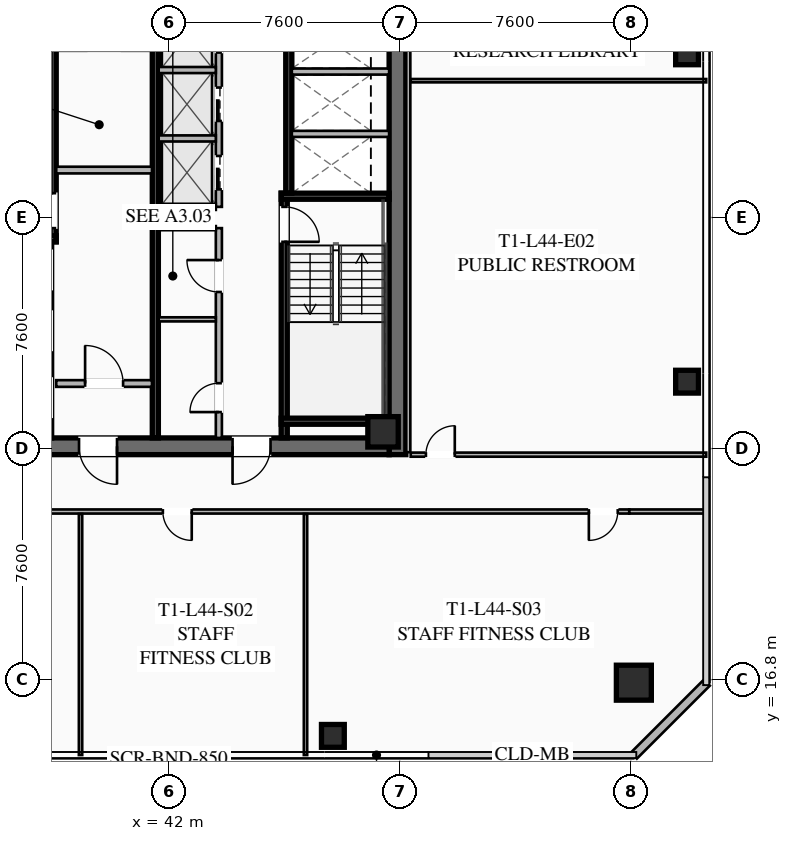
"""IFC4 building model, lengths in metres.
Left out: names, types, materials, properties, quantities, classifications, styles, units other than length and angle.
Written with IfcOpenShell. Run it as: python <this file> out.ifc"""

import sys

from ifc_helpers import new_model, si_unit, direction, frame, frame_2d, origin, origin_2d, place, context, subcontext, project, spatial, rectangle, hollow_rectangle, extrude, element, fill, save


model = new_model("IFC4")
c1 = context("Model", 3, precision=1e-05, world=origin(), true_north=direction((0.0, 1.0)))
c2 = subcontext(c1, "Body", "Model", "MODEL_VIEW")
j1 = project(units=[si_unit("LENGTHUNIT", "METRE"), si_unit("PLANEANGLEUNIT", "RADIAN")], contexts=[c1])
p1 = place(None, origin())
s1 = spatial("IfcSite", under=j1, at=p1, CompositionType="ELEMENT")
p2 = place(p1, origin())
s2 = spatial("IfcBuilding", under=s1, at=p2, CompositionType="ELEMENT")
p3 = place(p2, frame((0.0, 0.0, 164.1)))
s3 = spatial("IfcBuildingStorey", under=s2, at=p3, CompositionType="ELEMENT", Elevation=164.1)
p4 = place(p3, frame((49.525, 39.8, 0.0), z_axis=(0.0, 0.0, 1.0), x_axis=(0.0, -1.0, 0.0)))
e1 = element("IfcWall", 1, at=p4, inside=s3, PredefinedType="SHEAR", context=c2, shape_type="SweptSolid", body=[
    extrude(rectangle(XDim=15.6, YDim=0.55, at=frame_2d((7.8, 0.0))), origin(), (0.0, 0.0, 1.0), 3.55),
])
p5 = place(p3, frame((49.25, 24.475, 0.0), z_axis=(0.0, 0.0, 1.0), x_axis=(-1.0, 0.0, 0.0)))
e2 = element("IfcWall", 2, at=p5, inside=s3, PredefinedType="SHEAR", context=c2, shape_type="SweptSolid", body=[
    extrude(rectangle(XDim=14.5, YDim=0.55, at=frame_2d((7.25, 0.0))), origin(), (0.0, 0.0, 1.0), 3.55),
])
p6 = place(p5, frame((8.95, 0.0, 0.0)))
e3 = element("IfcOpeningElement", 3, at=p6, cuts=e2, PredefinedType="OPENING", context=c2, shape_type="SweptSolid", body=[
    extrude(rectangle(XDim=1.25, YDim=2.25, at=frame_2d((0.625, 1.125))), frame((0.0, 0.285, 0.0), z_axis=(0.0, -1.0, 0.0), x_axis=(1.0, 0.0, 0.0)), (0.0, 0.0, 1.0), 0.57),
])
p7 = place(p5, frame((3.9, 0.0, 0.0)))
e4 = element("IfcOpeningElement", 4, at=p7, cuts=e2, PredefinedType="OPENING", context=c2, shape_type="SweptSolid", body=[
    extrude(rectangle(XDim=1.25, YDim=2.25, at=frame_2d((0.625, 1.125))), frame((0.0, 0.285, 0.0), z_axis=(0.0, -1.0, 0.0), x_axis=(1.0, 0.0, 0.0)), (0.0, 0.0, 1.0), 0.57),
])
p8 = place(p3, frame((49.05, 24.95, 0.0), z_axis=(0.0, 0.0, 1.0), x_axis=(1.0, 0.0, 0.0)))
e5 = element("IfcColumn", 5, at=p8, inside=s3, PredefinedType="COLUMN", context=c2, shape_type="SweptSolid", body=[
    extrude(hollow_rectangle(XDim=1.0, YDim=1.0, WallThickness=0.04, at=origin_2d()), origin(), (0.0, 0.0, 1.0), 3.37),
])
p9 = place(p3, frame((57.3, 16.7, 0.0), z_axis=(0.0, 0.0, 1.0), x_axis=(1.0, 0.0, 0.0)))
e6 = element("IfcColumn", 6, at=p9, inside=s3, PredefinedType="COLUMN", context=c2, shape_type="SweptSolid", body=[
    extrude(hollow_rectangle(XDim=1.15, YDim=1.15, WallThickness=0.045, at=origin_2d()), origin(), (0.0, 0.0, 1.0), 3.37),
])
for number, where, z_axis, x_axis in (
    (7, (47.4, 14.95, 0.0), (0.0, 0.0, 1.0), (1.0, 0.0, 0.0)),
    (8, (59.05, 26.6, 0.0), (0.0, 0.0, 1.0), (1.0, 0.0, 0.0)),
    (9, (59.05, 37.4, 0.0), (0.0, 0.0, 1.0), (1.0, 0.0, 0.0)),
):
    element("IfcColumn", number, at=place(p3, frame(where, z_axis=z_axis, x_axis=x_axis)), inside=s3, PredefinedType="COLUMN", context=c2, shape_type="SweptSolid", body=[
        extrude(hollow_rectangle(XDim=0.75, YDim=0.75, WallThickness=0.032, at=origin_2d()), origin(), (0.0, 0.0, 1.0), 3.37),
    ])
p10 = place(p3, frame((59.7, 16.7, 0.0), z_axis=(0.0, 0.0, 1.0), x_axis=(-0.707106781187, -0.707106781187, 0.0)))
e10 = element("IfcWall", 10, at=p10, inside=s3, PredefinedType="SOLIDWALL", context=c2, shape_type="SweptSolid", body=[
    extrude(rectangle(XDim=3.394, YDim=0.28, at=frame_2d((1.697, 0.0))), origin(), (0.0, 0.0, 1.0), 3.37),
])
p11 = place(p3, frame((38.2, 31.2, 0.0), z_axis=(0.0, 0.0, 1.0), x_axis=(0.0, 1.0, 0.0)))
e11 = element("IfcWall", 11, at=p11, inside=s3, PredefinedType="SHEAR", context=c2, shape_type="SweptSolid", body=[
    extrude(rectangle(XDim=8.05, YDim=0.2, at=frame_2d((4.025, 0.0))), origin(), (0.0, 0.0, 1.0), 3.37),
])
p12 = place(p11, frame((0.45, 0.0, 0.0)))
e12 = element("IfcOpeningElement", 12, at=p12, cuts=e11, PredefinedType="OPENING", context=c2, shape_type="SweptSolid", body=[
    extrude(rectangle(XDim=1.15, YDim=2.2, at=frame_2d((0.575, 1.1))), frame((0.0, 0.11, 0.0), z_axis=(0.0, -1.0, 0.0), x_axis=(1.0, 0.0, 0.0)), (0.0, 0.0, 1.0), 0.22),
])
p13 = place(p3, frame((34.75, 31.3, 0.0), z_axis=(0.0, 0.0, 1.0), x_axis=(1.0, 0.0, 0.0)))
e13 = element("IfcWall", 13, at=p13, inside=s3, PredefinedType="SHEAR", context=c2, shape_type="SweptSolid", body=[
    extrude(rectangle(XDim=3.55, YDim=0.2, at=frame_2d((1.775, 0.0))), origin(), (0.0, 0.0, 1.0), 3.37),
])
p14 = place(p3, frame((45.8, 32.8, 0.0), z_axis=(0.0, 0.0, 1.0), x_axis=(0.0, -1.0, 0.0)))
e14 = element("IfcWall", 14, at=p14, inside=s3, PredefinedType="SHEAR", context=c2, shape_type="SweptSolid", body=[
    extrude(rectangle(XDim=8.05, YDim=0.2, at=frame_2d((4.025, 0.0))), origin(), (0.0, 0.0, 1.0), 3.37),
])
p15 = place(p14, frame((0.45, 0.0, 0.0)))
e15 = element("IfcOpeningElement", 15, at=p15, cuts=e14, PredefinedType="OPENING", context=c2, shape_type="SweptSolid", body=[
    extrude(rectangle(XDim=1.15, YDim=2.2, at=frame_2d((0.575, 1.1))), frame((0.0, 0.11, 0.0), z_axis=(0.0, -1.0, 0.0), x_axis=(1.0, 0.0, 0.0)), (0.0, 0.0, 1.0), 0.22),
])
for number, where, z_axis, x_axis in (
    (16, (45.7, 32.7, 0.0), (0.0, 0.0, 1.0), (1.0, 0.0, 0.0)),
    (17, (45.7, 25.3, 0.0), (0.0, 0.0, 1.0), (1.0, 0.0, 0.0)),
):
    element("IfcWall", number, at=place(p3, frame(where, z_axis=z_axis, x_axis=x_axis)), inside=s3, PredefinedType="SHEAR", context=c2, shape_type="SweptSolid", body=[
        extrude(rectangle(XDim=3.55, YDim=0.2, at=frame_2d((1.775, 0.0))), origin(), (0.0, 0.0, 1.0), 3.37),
    ])
p16 = place(p3, frame((41.56, 24.75, 0.0), z_axis=(0.0, 0.0, 1.0), x_axis=(0.0, 1.0, 0.0)))
e18 = element("IfcWall", 18, at=p16, inside=s3, PredefinedType="SHEAR", context=c2, shape_type="SweptSolid", body=[
    extrude(rectangle(XDim=14.5, YDim=0.2, at=frame_2d((7.25, 0.0))), origin(), (0.0, 0.0, 1.0), 3.37),
])
p17 = place(p3, frame((38.3, 33.56, 0.0), z_axis=(0.0, 0.0, 1.0), x_axis=(1.0, 0.0, 0.0)))
e19 = element("IfcWall", 19, at=p17, inside=s3, PredefinedType="SOLIDWALL", context=c2, shape_type="SweptSolid", body=[
    extrude(rectangle(XDim=3.15, YDim=0.22, at=frame_2d((1.575, 0.0))), origin(), (0.0, 0.0, 1.0), 2.723),
])
p18 = place(p3, frame((38.3, 26.54, 0.0), z_axis=(0.0, 0.0, 1.0), x_axis=(1.0, 0.0, 0.0)))
e20 = element("IfcWall", 20, at=p18, inside=s3, PredefinedType="SOLIDWALL", context=c2, shape_type="SweptSolid", body=[
    extrude(rectangle(XDim=3.15, YDim=0.22, at=frame_2d((1.575, 0.0))), origin(), (0.0, 0.0, 1.0), 2.723),
])
p19 = place(p18, frame((0.95, 0.0, 0.0)))
e21 = element("IfcOpeningElement", 21, at=p19, cuts=e20, PredefinedType="OPENING", context=c2, shape_type="SweptSolid", body=[
    extrude(rectangle(XDim=1.25, YDim=2.25, at=frame_2d((0.625, 1.125))), frame((0.0, 0.12, 0.0), z_axis=(0.0, -1.0, 0.0), x_axis=(1.0, 0.0, 0.0)), (0.0, 0.0, 1.0), 0.24),
])
p20 = place(p3, frame((45.95, 39.25, 0.0), z_axis=(0.0, 0.0, 1.0), x_axis=(0.0, -1.0, 0.0)))
e22 = element("IfcWall", 22, at=p20, inside=s3, PredefinedType="SHEAR", context=c2, shape_type="SweptSolid", body=[
    extrude(rectangle(XDim=6.45, YDim=0.2, at=frame_2d((3.225, 0.0))), origin(), (0.0, 0.0, 1.0), 3.37),
])
for number, where, z_axis, x_axis in (
    (23, (46.05, 34.75, 0.0), (0.0, 0.0, 1.0), (1.0, 0.0, 0.0)),
    (24, (46.05, 36.8, 0.0), (0.0, 0.0, 1.0), (1.0, 0.0, 0.0)),
):
    element("IfcWall", number, at=place(p3, frame(where, z_axis=z_axis, x_axis=x_axis)), inside=s3, PredefinedType="SOLIDWALL", context=c2, shape_type="SweptSolid", body=[
        extrude(rectangle(XDim=3.2, YDim=0.2, at=frame_2d((1.6, 0.0))), origin(), (0.0, 0.0, 1.0), 3.37),
    ])
p21 = place(p3, frame((43.65, 24.75, 0.0), z_axis=(0.0, 0.0, 1.0), x_axis=(0.0, 1.0, 0.0)))
e25 = element("IfcWall", 25, at=p21, inside=s3, PredefinedType="SOLIDWALL", context=c2, shape_type="SweptSolid", body=[
    extrude(rectangle(XDim=6.9, YDim=0.2, at=frame_2d((3.45, 0.0))), origin(), (0.0, 0.0, 1.0), 2.723),
])
p22 = place(p21, frame((0.85, 0.0, 0.0)))
e26 = element("IfcOpeningElement", 26, at=p22, cuts=e25, PredefinedType="OPENING", context=c2, shape_type="SweptSolid", body=[
    extrude(rectangle(XDim=0.95, YDim=2.05, at=frame_2d((0.475, 1.025))), frame((0.0, 0.11, 0.0), z_axis=(0.0, -1.0, 0.0), x_axis=(1.0, 0.0, 0.0)), (0.0, 0.0, 1.0), 0.22),
])
p23 = place(p21, frame((4.8, 0.0, 0.0)))
e27 = element("IfcOpeningElement", 27, at=p23, cuts=e25, PredefinedType="OPENING", context=c2, shape_type="SweptSolid", body=[
    extrude(rectangle(XDim=1.05, YDim=2.2, at=frame_2d((0.525, 1.1))), frame((0.0, 0.11, 0.0), z_axis=(0.0, -1.0, 0.0), x_axis=(1.0, 0.0, 0.0)), (0.0, 0.0, 1.0), 0.22),
])
for number, where, z_axis, x_axis in (
    (28, (41.67, 31.65, 0.0), (0.0, 0.0, 1.0), (1.0, 0.0, 0.0)),
    (29, (41.67, 28.65, 0.0), (0.0, 0.0, 1.0), (1.0, 0.0, 0.0)),
):
    element("IfcWall", number, at=place(p3, frame(where, z_axis=z_axis, x_axis=x_axis)), inside=s3, PredefinedType="PARTITIONING", context=c2, shape_type="SweptSolid", body=[
        extrude(rectangle(XDim=1.88, YDim=0.135, at=frame_2d((0.94, 0.0))), origin(), (0.0, 0.0, 1.0), 2.723),
    ])
p24 = place(p3, frame((43.65, 32.35, 0.0), z_axis=(0.0, 0.0, 1.0), x_axis=(0.0, 1.0, 0.0)))
e30 = element("IfcWall", 30, at=p24, inside=s3, PredefinedType="SOLIDWALL", context=c2, shape_type="SweptSolid", body=[
    extrude(rectangle(XDim=6.9, YDim=0.2, at=frame_2d((3.45, 0.0))), origin(), (0.0, 0.0, 1.0), 3.37),
])
p25 = place(p24, frame((0.575, 0.0, 0.0)))
e31 = element("IfcOpeningElement", 31, at=p25, cuts=e30, PredefinedType="OPENING", context=c2, shape_type="SweptSolid", body=[
    extrude(rectangle(XDim=1.1, YDim=2.2, at=frame_2d((0.55, 1.1))), frame((0.0, 0.11, 0.0), z_axis=(0.0, -1.0, 0.0), x_axis=(1.0, 0.0, 0.0)), (0.0, 0.0, 1.0), 0.22),
])
p26 = place(p24, frame((2.825, 0.0, 0.0)))
e32 = element("IfcOpeningElement", 32, at=p26, cuts=e30, PredefinedType="OPENING", context=c2, shape_type="SweptSolid", body=[
    extrude(rectangle(XDim=1.1, YDim=2.2, at=frame_2d((0.55, 1.1))), frame((0.0, 0.11, 0.0), z_axis=(0.0, -1.0, 0.0), x_axis=(1.0, 0.0, 0.0)), (0.0, 0.0, 1.0), 0.22),
])
p27 = place(p24, frame((5.075, 0.0, 0.0)))
e33 = element("IfcOpeningElement", 33, at=p27, cuts=e30, PredefinedType="OPENING", context=c2, shape_type="SweptSolid", body=[
    extrude(rectangle(XDim=1.1, YDim=2.2, at=frame_2d((0.55, 1.1))), frame((0.0, 0.11, 0.0), z_axis=(0.0, -1.0, 0.0), x_axis=(1.0, 0.0, 0.0)), (0.0, 0.0, 1.0), 0.22),
])
for number, where, z_axis, x_axis in (
    (34, (41.67, 32.35, 0.0), (0.0, 0.0, 1.0), (1.0, 0.0, 0.0)),
    (35, (41.67, 34.6, 0.0), (0.0, 0.0, 1.0), (1.0, 0.0, 0.0)),
    (36, (41.67, 36.85, 0.0), (0.0, 0.0, 1.0), (1.0, 0.0, 0.0)),
):
    element("IfcWall", number, at=place(p3, frame(where, z_axis=z_axis, x_axis=x_axis)), inside=s3, PredefinedType="SOLIDWALL", context=c2, shape_type="SweptSolid", body=[
        extrude(rectangle(XDim=1.88, YDim=0.2, at=frame_2d((0.94, 0.0))), origin(), (0.0, 0.0, 1.0), 3.37),
    ])
p28 = place(p3, frame((57.15, 22.33, 0.0), z_axis=(0.0, 0.0, 1.0), x_axis=(-1.0, 0.0, 0.0)))
e37 = element("IfcWall", 37, at=p28, inside=s3, PredefinedType="PARTITIONING", context=c2, shape_type="SweptSolid", body=[
    extrude(rectangle(XDim=30.3, YDim=0.135, at=frame_2d((15.15, 0.0))), origin(), (0.0, 0.0, 1.0), 2.723),
])
p29 = place(p28, frame((28.97, 0.0, 0.0)))
e38 = element("IfcOpeningElement", 38, at=p29, cuts=e37, PredefinedType="OPENING", context=c2, shape_type="SweptSolid", body=[
    extrude(rectangle(XDim=0.95, YDim=2.05, at=frame_2d((0.475, 1.025))), frame((0.0, 0.077, 0.0), z_axis=(0.0, -1.0, 0.0), x_axis=(1.0, 0.0, 0.0)), (0.0, 0.0, 1.0), 0.155),
])
p30 = place(p28, frame((14.392, 0.0, 0.0)))
e39 = element("IfcOpeningElement", 39, at=p30, cuts=e37, PredefinedType="OPENING", context=c2, shape_type="SweptSolid", body=[
    extrude(rectangle(XDim=0.95, YDim=2.05, at=frame_2d((0.475, 1.025))), frame((0.0, 0.077, 0.0), z_axis=(0.0, -1.0, 0.0), x_axis=(1.0, 0.0, 0.0)), (0.0, 0.0, 1.0), 0.155),
])
p31 = place(p28, frame((0.38, 0.0, 0.0)))
e40 = element("IfcOpeningElement", 40, at=p31, cuts=e37, PredefinedType="OPENING", context=c2, shape_type="SweptSolid", body=[
    extrude(rectangle(XDim=0.95, YDim=2.05, at=frame_2d((0.475, 1.025))), frame((0.0, 0.077, 0.0), z_axis=(0.0, -1.0, 0.0), x_axis=(1.0, 0.0, 0.0)), (0.0, 0.0, 1.0), 0.155),
])
p32 = place(p3, frame((57.15, 22.33, 0.0), z_axis=(0.0, 0.0, 1.0), x_axis=(1.0, 0.0, 0.0)))
e41 = element("IfcWall", 41, at=p32, inside=s3, PredefinedType="PARTITIONING", context=c2, shape_type="SweptSolid", body=[
    extrude(rectangle(XDim=2.53, YDim=0.135, at=frame_2d((1.265, 0.0))), origin(), (0.0, 0.0, 1.0), 2.723),
])
for number, where, z_axis, x_axis in (
    (42, (39.1, 14.32, 0.0), (0.0, 0.0, 1.0), (0.0, 1.0, 0.0)),
    (43, (46.5, 14.32, 0.0), (0.0, 0.0, 1.0), (0.0, 1.0, 0.0)),
):
    element("IfcWall", number, at=place(p3, frame(where, z_axis=z_axis, x_axis=x_axis)), inside=s3, PredefinedType="PARTITIONING", context=c2, shape_type="SweptSolid", body=[
        extrude(rectangle(XDim=7.93, YDim=0.11, at=frame_2d((3.965, 0.0))), origin(), (0.0, 0.0, 1.0), 2.723),
    ])
p33 = place(p3, frame((49.88, 39.72, 0.0), z_axis=(0.0, 0.0, 1.0), x_axis=(0.0, -1.0, 0.0)))
e44 = element("IfcWall", 44, at=p33, inside=s3, PredefinedType="PARTITIONING", context=c2, shape_type="SweptSolid", body=[
    extrude(rectangle(XDim=15.44, YDim=0.135, at=frame_2d((7.72, 0.0))), origin(), (0.0, 0.0, 1.0), 2.723),
])
p34 = place(p3, frame((49.96, 24.2, 0.0), z_axis=(0.0, 0.0, 1.0), x_axis=(1.0, 0.0, 0.0)))
e45 = element("IfcWall", 45, at=p34, inside=s3, PredefinedType="PARTITIONING", context=c2, shape_type="SweptSolid", body=[
    extrude(rectangle(XDim=9.72, YDim=0.135, at=frame_2d((4.86, 0.0))), origin(), (0.0, 0.0, 1.0), 2.723),
])
p35 = place(p34, frame((0.5, 0.0, 0.0)))
e46 = element("IfcOpeningElement", 46, at=p35, cuts=e45, PredefinedType="OPENING", context=c2, shape_type="SweptSolid", body=[
    extrude(rectangle(XDim=0.95, YDim=2.05, at=frame_2d((0.475, 1.025))), frame((0.0, 0.077, 0.0), z_axis=(0.0, -1.0, 0.0), x_axis=(1.0, 0.0, 0.0)), (0.0, 0.0, 1.0), 0.155),
])
p36 = place(p3, frame((49.96, 36.5, 0.0), z_axis=(0.0, 0.0, 1.0), x_axis=(1.0, 0.0, 0.0)))
e47 = element("IfcWall", 47, at=p36, inside=s3, PredefinedType="PARTITIONING", context=c2, shape_type="SweptSolid", body=[
    extrude(rectangle(XDim=9.72, YDim=0.11, at=frame_2d((4.86, 0.0))), origin(), (0.0, 0.0, 1.0), 2.723),
])
p37 = place(p6, origin())
e48 = element("IfcDoor", 48, at=p37, inside=s3, OperationType="SINGLE_SWING_LEFT", PredefinedType="DOOR", context=c2, shape_type="SweptSolid", body=[
    extrude(rectangle(XDim=1.25, YDim=2.25, at=frame_2d((0.625, 1.125))), frame((0.0, 0.025, 0.0), z_axis=(0.0, -1.0, 0.0), x_axis=(1.0, 0.0, 0.0)), (0.0, 0.0, 1.0), 0.05),
])
fill(e3, e48)
p38 = place(p7, origin())
e49 = element("IfcDoor", 49, at=p38, inside=s3, OperationType="SINGLE_SWING_RIGHT", PredefinedType="DOOR", context=c2, shape_type="SweptSolid", body=[
    extrude(rectangle(XDim=1.25, YDim=2.25, at=frame_2d((0.625, 1.125))), frame((0.0, 0.025, 0.0), z_axis=(0.0, -1.0, 0.0), x_axis=(1.0, 0.0, 0.0)), (0.0, 0.0, 1.0), 0.05),
])
fill(e4, e49)
p39 = place(p12, origin())
e50 = element("IfcDoor", 50, at=p39, inside=s3, OperationType="SINGLE_SWING_RIGHT", PredefinedType="DOOR", context=c2, shape_type="SweptSolid", body=[
    extrude(rectangle(XDim=1.15, YDim=2.2, at=frame_2d((0.575, 1.1))), frame((0.0, 0.025, 0.0), z_axis=(0.0, -1.0, 0.0), x_axis=(1.0, 0.0, 0.0)), (0.0, 0.0, 1.0), 0.05),
])
fill(e12, e50)
p40 = place(p15, origin())
e51 = element("IfcDoor", 51, at=p40, inside=s3, OperationType="SINGLE_SWING_RIGHT", PredefinedType="DOOR", context=c2, shape_type="SweptSolid", body=[
    extrude(rectangle(XDim=1.15, YDim=2.2, at=frame_2d((0.575, 1.1))), frame((0.0, 0.025, 0.0), z_axis=(0.0, -1.0, 0.0), x_axis=(1.0, 0.0, 0.0)), (0.0, 0.0, 1.0), 0.05),
])
fill(e15, e51)
p41 = place(p19, origin())
e52 = element("IfcDoor", 52, at=p41, inside=s3, OperationType="SINGLE_SWING_LEFT", PredefinedType="DOOR", context=c2, shape_type="SweptSolid", body=[
    extrude(rectangle(XDim=1.25, YDim=2.25, at=frame_2d((0.625, 1.125))), frame((0.0, 0.025, 0.0), z_axis=(0.0, -1.0, 0.0), x_axis=(1.0, 0.0, 0.0)), (0.0, 0.0, 1.0), 0.05),
])
fill(e21, e52)
p42 = place(p22, origin())
e53 = element("IfcDoor", 53, at=p42, inside=s3, OperationType="SINGLE_SWING_LEFT", PredefinedType="DOOR", context=c2, shape_type="SweptSolid", body=[
    extrude(rectangle(XDim=0.95, YDim=2.05, at=frame_2d((0.475, 1.025))), frame((0.0, 0.025, 0.0), z_axis=(0.0, -1.0, 0.0), x_axis=(1.0, 0.0, 0.0)), (0.0, 0.0, 1.0), 0.05),
])
fill(e26, e53)
p43 = place(p23, origin())
e54 = element("IfcDoor", 54, at=p43, inside=s3, OperationType="SINGLE_SWING_RIGHT", PredefinedType="DOOR", context=c2, shape_type="SweptSolid", body=[
    extrude(rectangle(XDim=1.05, YDim=2.2, at=frame_2d((0.525, 1.1))), frame((0.0, 0.025, 0.0), z_axis=(0.0, -1.0, 0.0), x_axis=(1.0, 0.0, 0.0)), (0.0, 0.0, 1.0), 0.05),
])
fill(e27, e54)
p44 = place(p30, origin())
e55 = element("IfcDoor", 55, at=p44, inside=s3, OperationType="SINGLE_SWING_LEFT", PredefinedType="DOOR", context=c2, shape_type="SweptSolid", body=[
    extrude(rectangle(XDim=0.95, YDim=2.05, at=frame_2d((0.475, 1.025))), frame((0.0, 0.025, 0.0), z_axis=(0.0, -1.0, 0.0), x_axis=(1.0, 0.0, 0.0)), (0.0, 0.0, 1.0), 0.05),
])
fill(e39, e55)
p45 = place(p31, origin())
e56 = element("IfcDoor", 56, at=p45, inside=s3, OperationType="SINGLE_SWING_RIGHT", PredefinedType="DOOR", context=c2, shape_type="SweptSolid", body=[
    extrude(rectangle(XDim=0.95, YDim=2.05, at=frame_2d((0.475, 1.025))), frame((0.0, 0.025, 0.0), z_axis=(0.0, -1.0, 0.0), x_axis=(1.0, 0.0, 0.0)), (0.0, 0.0, 1.0), 0.05),
])
fill(e40, e56)
p46 = place(p35, origin())
e57 = element("IfcDoor", 57, at=p46, inside=s3, OperationType="SINGLE_SWING_RIGHT", PredefinedType="DOOR", context=c2, shape_type="SweptSolid", body=[
    extrude(rectangle(XDim=0.95, YDim=2.05, at=frame_2d((0.475, 1.025))), frame((0.0, 0.025, 0.0), z_axis=(0.0, -1.0, 0.0), x_axis=(1.0, 0.0, 0.0)), (0.0, 0.0, 1.0), 0.05),
])
fill(e46, e57)
p47 = place(p25, origin())
e58 = element("IfcDoor", 58, at=p47, inside=s3, OperationType="SLIDING_TO_LEFT", PredefinedType="DOOR", context=c2, shape_type="SweptSolid", body=[
    extrude(rectangle(XDim=1.1, YDim=2.2, at=frame_2d((0.55, 1.1))), frame((0.0, 0.025, 0.0), z_axis=(0.0, -1.0, 0.0), x_axis=(1.0, 0.0, 0.0)), (0.0, 0.0, 1.0), 0.05),
])
fill(e31, e58)
p48 = place(p26, origin())
e59 = element("IfcDoor", 59, at=p48, inside=s3, OperationType="SLIDING_TO_LEFT", PredefinedType="DOOR", context=c2, shape_type="SweptSolid", body=[
    extrude(rectangle(XDim=1.1, YDim=2.2, at=frame_2d((0.55, 1.1))), frame((0.0, 0.025, 0.0), z_axis=(0.0, -1.0, 0.0), x_axis=(1.0, 0.0, 0.0)), (0.0, 0.0, 1.0), 0.05),
])
fill(e32, e59)
save(model, sys.argv[1])
